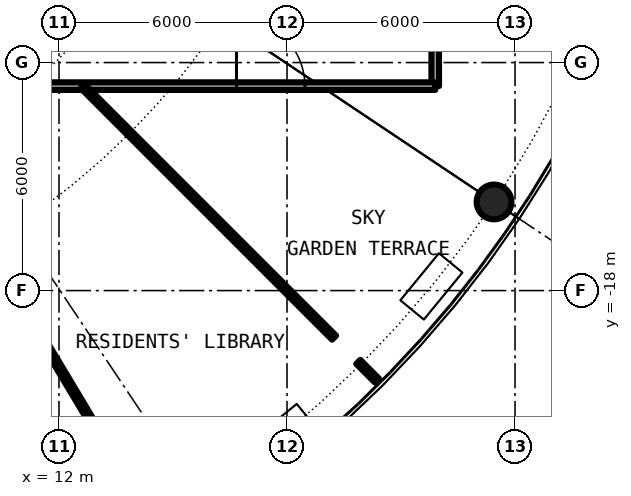
"""IFC4 building model, lengths in metres.
Left out: names, types, materials, properties, quantities, classifications, styles, units other than length and angle.
Written with IfcOpenShell. Run it as: python <this file> out.ifc"""

import sys

from ifc_helpers import new_model, si_unit, direction, frame, frame_2d, origin, origin_2d, place, context, subcontext, project, spatial, rectangle, hollow_circle, extrude, element, fill, save


model = new_model("IFC4")
c1 = context("Model", 3, precision=1e-05, world=origin(), true_north=direction((0.0, 1.0)))
c2 = subcontext(c1, "Body", "Model", "MODEL_VIEW")
j1 = project(units=[si_unit("LENGTHUNIT", "METRE"), si_unit("PLANEANGLEUNIT", "RADIAN")], contexts=[c1])
p1 = place(None, origin())
s1 = spatial("IfcSite", under=j1, at=p1, CompositionType="ELEMENT")
p2 = place(p1, origin())
s2 = spatial("IfcBuilding", under=s1, at=p2, CompositionType="ELEMENT")
p3 = place(p2, frame((0.0, 0.0, 139.1)))
s3 = spatial("IfcBuildingStorey", under=s2, at=p3, CompositionType="ELEMENT", Elevation=139.1)
p4 = place(p3, frame((23.448, -15.667, 0.0), z_axis=(0.0, 0.0, 1.0), x_axis=(1.0, 0.0, 0.0)))
e1 = element("IfcColumn", 1, at=p4, inside=s3, PredefinedType="COLUMN", context=c2, shape_type="SweptSolid", body=[
    extrude(hollow_circle(Radius=0.457, WallThickness=0.04, at=origin_2d()), origin(), (0.0, 0.0, 1.0), 6.1),
])
p5 = place(p3, frame((21.9, -12.62, 0.0), z_axis=(0.0, 0.0, 1.0), x_axis=(0.0, 1.0, 0.0)))
e2 = element("IfcWall", 2, at=p5, inside=s3, PredefinedType="PARTITIONING", context=c2, shape_type="SweptSolid", body=[
    extrude(rectangle(XDim=3.4, YDim=0.2, at=frame_2d((1.7, 0.0))), origin(), (0.0, 0.0, 1.0), 5.75),
])
p6 = place(p3, frame((6.0, -12.62, 0.0), z_axis=(0.0, 0.0, 1.0), x_axis=(1.0, 0.0, 0.0)))
e3 = element("IfcWall", 3, at=p6, inside=s3, PredefinedType="PARTITIONING", context=c2, shape_type="SweptSolid", body=[
    extrude(rectangle(XDim=15.9, YDim=0.2, at=frame_2d((7.95, 0.0))), origin(), (0.0, 0.0, 1.0), 5.75),
])
p7 = place(p6, frame((3.593, 0.0, 0.0)))
e4 = element("IfcOpeningElement", 4, at=p7, cuts=e3, PredefinedType="OPENING", context=c2, shape_type="SweptSolid", body=[
    extrude(rectangle(XDim=1.0, YDim=2.3, at=frame_2d((0.5, 1.15))), frame((0.0, 0.11, 0.0), z_axis=(0.0, -1.0, 0.0), x_axis=(1.0, 0.0, 0.0)), (0.0, 0.0, 1.0), 0.22),
])
p8 = place(p6, frame((10.67, 0.0, 0.0)))
e5 = element("IfcOpeningElement", 5, at=p8, cuts=e3, PredefinedType="OPENING", context=c2, shape_type="SweptSolid", body=[
    extrude(rectangle(XDim=1.8, YDim=2.3, at=frame_2d((0.9, 1.15))), frame((0.0, 0.11, 0.0), z_axis=(0.0, -1.0, 0.0), x_axis=(1.0, 0.0, 0.0)), (0.0, 0.0, 1.0), 0.22),
])
p9 = place(p3, frame((7.566, -12.62, 0.0), z_axis=(0.0, 0.0, 1.0), x_axis=(0.514240323404, -0.857646133195, 0.0)))
e6 = element("IfcWall", 6, at=p9, inside=s3, PredefinedType="PARTITIONING", context=c2, shape_type="SweptSolid", body=[
    extrude(rectangle(XDim=12.792, YDim=0.15, at=frame_2d((6.396, 0.0))), origin(), (0.0, 0.0, 1.0), 5.75),
])
p10 = place(p3, frame((12.62, -12.62, 0.0), z_axis=(0.0, 0.0, 1.0), x_axis=(0.707106781187, -0.707106781187, 0.0)))
e7 = element("IfcWall", 7, at=p10, inside=s3, PredefinedType="PARTITIONING", context=c2, shape_type="SweptSolid", body=[
    extrude(rectangle(XDim=9.361, YDim=0.15, at=frame_2d((4.68, 0.0))), origin(), (0.0, 0.0, 1.0), 5.75),
])
p11 = place(p3, frame((19.875, -19.875, 0.0), z_axis=(0.0, 0.0, 1.0), x_axis=(0.707106781187, -0.707106781187, 0.0)))
e8 = element("IfcWall", 8, at=p11, inside=s3, PredefinedType="PARTITIONING", context=c2, shape_type="SweptSolid", body=[
    extrude(rectangle(XDim=0.693, YDim=0.15, at=frame_2d((0.346, 0.0))), origin(), (0.0, 0.0, 1.0), 5.75),
])
p12 = place(p8, origin())
e9 = element("IfcDoor", 9, at=p12, inside=s3, OperationType="DOUBLE_DOOR_SINGLE_SWING", PredefinedType="DOOR", context=c2, shape_type="SweptSolid", body=[
    extrude(rectangle(XDim=1.8, YDim=2.3, at=frame_2d((0.9, 1.15))), frame((0.0, 0.025, 0.0), z_axis=(0.0, -1.0, 0.0), x_axis=(1.0, 0.0, 0.0)), (0.0, 0.0, 1.0), 0.05),
])
fill(e5, e9)
save(model, sys.argv[1])
